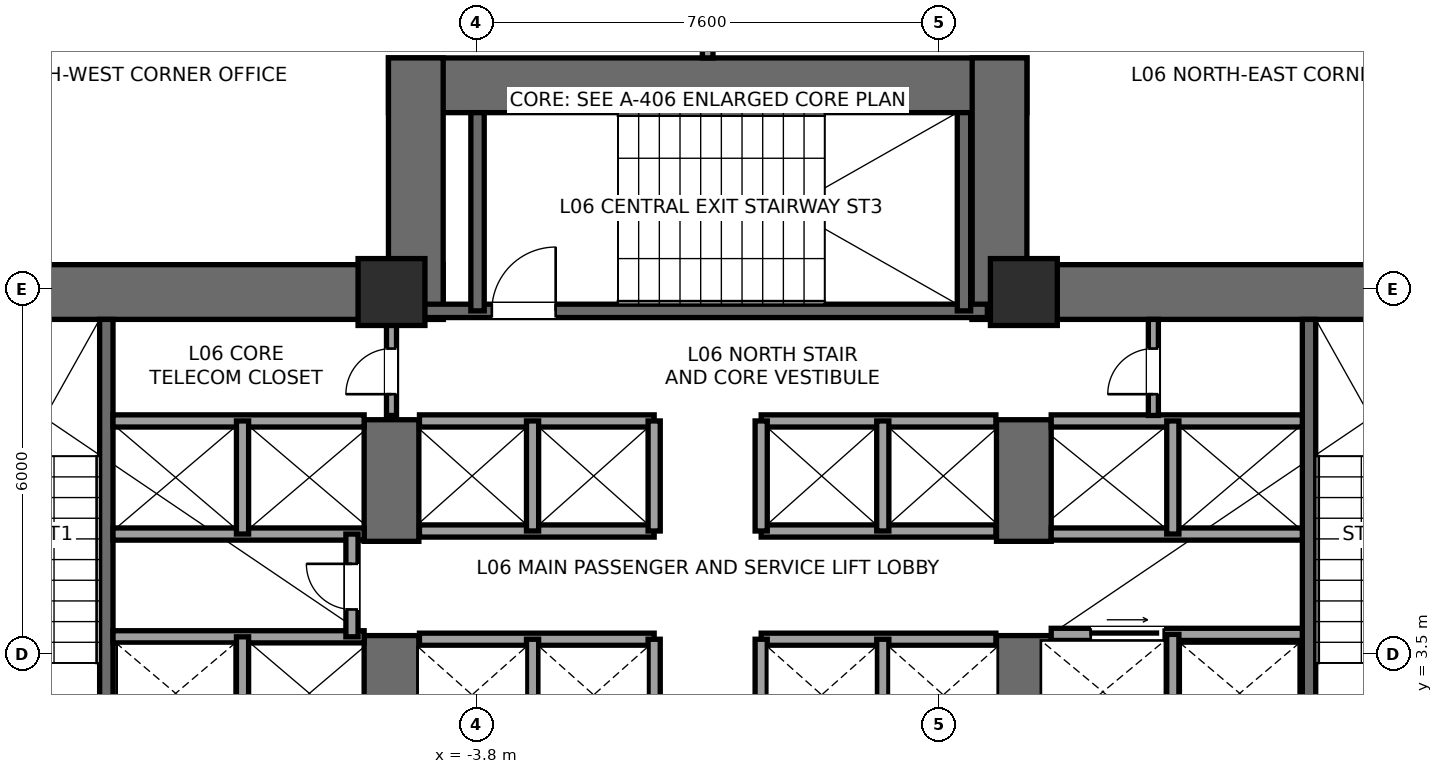
"""IFC4 building model, lengths in metres.
Left out: names, types, materials, properties, quantities, classifications, styles, units other than length and angle.
Written with IfcOpenShell. Run it as: python <this file> out.ifc"""

import sys

from ifc_helpers import new_model, si_unit, direction, frame, frame_2d, origin, origin_2d, place, context, subcontext, project, spatial, rectangle, extrude, element, fill, save


model = new_model("IFC4")
c1 = context("Model", 3, precision=1e-05, world=origin(), true_north=direction((0.0, 1.0)))
c2 = subcontext(c1, "Body", "Model", "MODEL_VIEW")
j1 = project(units=[si_unit("LENGTHUNIT", "METRE"), si_unit("PLANEANGLEUNIT", "RADIAN")], contexts=[c1])
p1 = place(None, origin())
s1 = spatial("IfcSite", under=j1, at=p1, CompositionType="ELEMENT")
p2 = place(p1, origin())
s2 = spatial("IfcBuilding", under=s1, at=p2, CompositionType="ELEMENT")
p3 = place(p2, frame((0.0, 0.0, 27.0)))
s3 = spatial("IfcBuildingStorey", under=s2, at=p3, CompositionType="ELEMENT", Elevation=27.0)
p4 = place(p3, frame((-14.05, 9.45, 0.0), z_axis=(0.0, 0.0, 1.0), x_axis=(1.0, 0.0, 0.0)))
e1 = element("IfcWall", 1, at=p4, inside=s3, PredefinedType="SHEAR", context=c2, shape_type="SweptSolid", body=[
    extrude(rectangle(XDim=9.7, YDim=0.9, at=frame_2d((4.85, 0.0))), origin(), (0.0, 0.0, 1.0), 3.6),
])
p5 = place(p3, frame((-5.2, 0.95, 0.0), z_axis=(0.0, 0.0, 1.0), x_axis=(0.0, 1.0, 0.0)))
e2 = element("IfcWall", 2, at=p5, inside=s3, PredefinedType="SHEAR", context=c2, shape_type="SweptSolid", body=[
    extrude(rectangle(XDim=2.85, YDim=0.9, at=frame_2d((1.425, 0.0))), origin(), (0.0, 0.0, 1.0), 3.6),
])
p6 = place(p3, frame((-5.2, 5.35, 0.0), z_axis=(0.0, 0.0, 1.0), x_axis=(0.0, 1.0, 0.0)))
e3 = element("IfcWall", 3, at=p6, inside=s3, PredefinedType="SHEAR", context=c2, shape_type="SweptSolid", body=[
    extrude(rectangle(XDim=2.0, YDim=0.9, at=frame_2d((1.0, 0.0))), origin(), (0.0, 0.0, 1.0), 3.6),
])
p7 = place(p3, frame((-9.89, 1.85, 0.0), z_axis=(0.0, 0.0, 1.0), x_axis=(0.0, 1.0, 0.0)))
e4 = element("IfcWall", 4, at=p7, inside=s3, PredefinedType="SHEAR", context=c2, shape_type="SweptSolid", body=[
    extrude(rectangle(XDim=7.15, YDim=0.22, at=frame_2d((3.575, 0.0))), origin(), (0.0, 0.0, 1.0), 3.6),
])
p8 = place(p3, frame((4.35, 9.45, 0.0), z_axis=(0.0, 0.0, 1.0), x_axis=(1.0, 0.0, 0.0)))
e5 = element("IfcWall", 5, at=p8, inside=s3, PredefinedType="SHEAR", context=c2, shape_type="SweptSolid", body=[
    extrude(rectangle(XDim=9.7, YDim=0.9, at=frame_2d((4.85, 0.0))), origin(), (0.0, 0.0, 1.0), 3.6),
])
p9 = place(p3, frame((5.2, 0.95, 0.0), z_axis=(0.0, 0.0, 1.0), x_axis=(0.0, 1.0, 0.0)))
e6 = element("IfcWall", 6, at=p9, inside=s3, PredefinedType="SHEAR", context=c2, shape_type="SweptSolid", body=[
    extrude(rectangle(XDim=2.85, YDim=0.9, at=frame_2d((1.425, 0.0))), origin(), (0.0, 0.0, 1.0), 3.6),
])
p10 = place(p3, frame((5.2, 5.35, 0.0), z_axis=(0.0, 0.0, 1.0), x_axis=(0.0, 1.0, 0.0)))
e7 = element("IfcWall", 7, at=p10, inside=s3, PredefinedType="SHEAR", context=c2, shape_type="SweptSolid", body=[
    extrude(rectangle(XDim=2.0, YDim=0.9, at=frame_2d((1.0, 0.0))), origin(), (0.0, 0.0, 1.0), 3.6),
])
p11 = place(p3, frame((9.89, 1.85, 0.0), z_axis=(0.0, 0.0, 1.0), x_axis=(0.0, 1.0, 0.0)))
e8 = element("IfcWall", 8, at=p11, inside=s3, PredefinedType="SHEAR", context=c2, shape_type="SweptSolid", body=[
    extrude(rectangle(XDim=7.15, YDim=0.22, at=frame_2d((3.575, 0.0))), origin(), (0.0, 0.0, 1.0), 3.6),
])
p12 = place(p3, frame((-5.25, 12.85, 0.0), z_axis=(0.0, 0.0, 1.0), x_axis=(1.0, 0.0, 0.0)))
e9 = element("IfcWall", 9, at=p12, inside=s3, PredefinedType="SHEAR", context=c2, shape_type="SweptSolid", body=[
    extrude(rectangle(XDim=10.5, YDim=0.9, at=frame_2d((5.25, 0.0))), origin(), (0.0, 0.0, 1.0), 3.6),
])
for number, where, z_axis, x_axis in (
    (10, (-4.8, 9.0, 0.0), (0.0, 0.0, 1.0), (0.0, 1.0, 0.0)),
    (11, (4.8, 9.0, 0.0), (0.0, 0.0, 1.0), (0.0, 1.0, 0.0)),
):
    element("IfcWall", number, at=place(p3, frame(where, z_axis=z_axis, x_axis=x_axis)), inside=s3, PredefinedType="SHEAR", context=c2, shape_type="SweptSolid", body=[
        extrude(rectangle(XDim=4.3, YDim=0.9, at=frame_2d((2.15, 0.0))), origin(), (0.0, 0.0, 1.0), 3.6),
    ])
p13 = place(p3, frame((-4.7, 9.14, 0.0), z_axis=(0.0, 0.0, 1.0), x_axis=(1.0, 0.0, 0.0)))
e12 = element("IfcWall", 12, at=p13, inside=s3, PredefinedType="SHEAR", context=c2, shape_type="SweptSolid", body=[
    extrude(rectangle(XDim=9.3, YDim=0.22, at=frame_2d((4.65, 0.0))), origin(), (0.0, 0.0, 1.0), 3.6),
])
p14 = place(p13, frame((1.15, 0.0, 0.0)))
e13 = element("IfcOpeningElement", 13, at=p14, cuts=e12, PredefinedType="OPENING", context=c2, shape_type="SweptSolid", body=[
    extrude(rectangle(XDim=1.05, YDim=2.15, at=frame_2d((0.525, 1.075))), frame((0.0, 0.12, 0.0), z_axis=(0.0, -1.0, 0.0), x_axis=(1.0, 0.0, 0.0)), (0.0, 0.0, 1.0), 0.24),
])
for number, where, z_axis, x_axis in (
    (14, (-3.785, 9.14, 0.0), (0.0, 0.0, 1.0), (0.0, 1.0, 0.0)),
    (15, (4.215, 9.14, 0.0), (0.0, 0.0, 1.0), (0.0, 1.0, 0.0)),
):
    element("IfcWall", number, at=place(p3, frame(where, z_axis=z_axis, x_axis=x_axis)), inside=s3, PredefinedType="SHEAR", context=c2, shape_type="SweptSolid", body=[
        extrude(rectangle(XDim=3.26, YDim=0.22, at=frame_2d((1.63, 0.0))), origin(), (0.0, 0.0, 1.0), 3.6),
    ])
for number, where, z_axis, x_axis in (
    (16, (-5.2, 9.45, 0.0), (0.0, 0.0, 1.0), (1.0, 0.0, 0.0)),
    (17, (5.2, 9.45, 0.0), (0.0, 0.0, 1.0), (1.0, 0.0, 0.0)),
):
    element("IfcColumn", number, at=place(p3, frame(where, z_axis=z_axis, x_axis=x_axis)), inside=s3, PredefinedType="COLUMN", context=c2, shape_type="SweptSolid", body=[
        extrude(rectangle(XDim=1.1, YDim=1.1, at=origin_2d()), origin(), (0.0, 0.0, 1.0), 3.6),
    ])
p15 = place(p3, frame((-9.78, 3.78, 0.0), z_axis=(0.0, 0.0, 1.0), x_axis=(1.0, 0.0, 0.0)))
e18 = element("IfcWall", 18, at=p15, inside=s3, PredefinedType="SOLIDWALL", context=c2, shape_type="SweptSolid", body=[
    extrude(rectangle(XDim=4.13, YDim=0.2, at=frame_2d((2.065, 0.0))), origin(), (0.0, 0.0, 1.0), 3.4),
])
p16 = place(p3, frame((-7.65, 1.85, 0.0), z_axis=(0.0, 0.0, 1.0), x_axis=(0.0, 1.0, 0.0)))
e19 = element("IfcWall", 19, at=p16, inside=s3, PredefinedType="SOLIDWALL", context=c2, shape_type="SweptSolid", body=[
    extrude(rectangle(XDim=1.93, YDim=0.2, at=frame_2d((0.965, 0.0))), origin(), (0.0, 0.0, 1.0), 3.4),
])
for number, where, z_axis, x_axis in (
    (20, (-9.78, 5.47, 0.0), (0.0, 0.0, 1.0), (1.0, 0.0, 0.0)),
    (21, (-9.78, 7.33, 0.0), (0.0, 0.0, 1.0), (1.0, 0.0, 0.0)),
):
    element("IfcWall", number, at=place(p3, frame(where, z_axis=z_axis, x_axis=x_axis)), inside=s3, PredefinedType="SOLIDWALL", context=c2, shape_type="SweptSolid", body=[
        extrude(rectangle(XDim=4.13, YDim=0.2, at=frame_2d((2.065, 0.0))), origin(), (0.0, 0.0, 1.0), 3.4),
    ])
p17 = place(p3, frame((-7.65, 5.47, 0.0), z_axis=(0.0, 0.0, 1.0), x_axis=(0.0, 1.0, 0.0)))
e22 = element("IfcWall", 22, at=p17, inside=s3, PredefinedType="SOLIDWALL", context=c2, shape_type="SweptSolid", body=[
    extrude(rectangle(XDim=1.86, YDim=0.2, at=frame_2d((0.93, 0.0))), origin(), (0.0, 0.0, 1.0), 3.4),
])
p18 = place(p3, frame((-5.85, 3.78, 0.0), z_axis=(0.0, 0.0, 1.0), x_axis=(0.0, 1.0, 0.0)))
e23 = element("IfcWall", 23, at=p18, inside=s3, PredefinedType="SOLIDWALL", context=c2, shape_type="SweptSolid", body=[
    extrude(rectangle(XDim=1.69, YDim=0.2, at=frame_2d((0.845, 0.0))), origin(), (0.0, 0.0, 1.0), 3.4),
])
p19 = place(p18, frame((0.45, 0.0, 0.0)))
e24 = element("IfcOpeningElement", 24, at=p19, cuts=e23, PredefinedType="OPENING", context=c2, shape_type="SweptSolid", body=[
    extrude(rectangle(XDim=0.75, YDim=2.1, at=frame_2d((0.375, 1.05))), frame((0.0, 0.11, 0.0), z_axis=(0.0, -1.0, 0.0), x_axis=(1.0, 0.0, 0.0)), (0.0, 0.0, 1.0), 0.22),
])
p20 = place(p3, frame((5.65, 3.82, 0.0), z_axis=(0.0, 0.0, 1.0), x_axis=(1.0, 0.0, 0.0)))
e25 = element("IfcWall", 25, at=p20, inside=s3, PredefinedType="SOLIDWALL", context=c2, shape_type="SweptSolid", body=[
    extrude(rectangle(XDim=4.13, YDim=0.2, at=frame_2d((2.065, 0.0))), origin(), (0.0, 0.0, 1.0), 3.4),
])
p21 = place(p20, frame((0.65, 0.0, 0.0)))
e26 = element("IfcOpeningElement", 26, at=p21, cuts=e25, PredefinedType="OPENING", context=c2, shape_type="SweptSolid", body=[
    extrude(rectangle(XDim=1.2, YDim=2.2, at=frame_2d((0.6, 1.1))), frame((0.0, 0.11, 0.0), z_axis=(0.0, -1.0, 0.0), x_axis=(1.0, 0.0, 0.0)), (0.0, 0.0, 1.0), 0.22),
])
p22 = place(p3, frame((7.65, 1.85, 0.0), z_axis=(0.0, 0.0, 1.0), x_axis=(0.0, 1.0, 0.0)))
e27 = element("IfcWall", 27, at=p22, inside=s3, PredefinedType="SOLIDWALL", context=c2, shape_type="SweptSolid", body=[
    extrude(rectangle(XDim=1.97, YDim=0.2, at=frame_2d((0.985, 0.0))), origin(), (0.0, 0.0, 1.0), 3.4),
])
for number, where, z_axis, x_axis in (
    (28, (5.65, 5.47, 0.0), (0.0, 0.0, 1.0), (1.0, 0.0, 0.0)),
    (29, (5.65, 7.33, 0.0), (0.0, 0.0, 1.0), (1.0, 0.0, 0.0)),
):
    element("IfcWall", number, at=place(p3, frame(where, z_axis=z_axis, x_axis=x_axis)), inside=s3, PredefinedType="SOLIDWALL", context=c2, shape_type="SweptSolid", body=[
        extrude(rectangle(XDim=4.13, YDim=0.2, at=frame_2d((2.065, 0.0))), origin(), (0.0, 0.0, 1.0), 3.4),
    ])
p23 = place(p3, frame((7.65, 5.47, 0.0), z_axis=(0.0, 0.0, 1.0), x_axis=(0.0, 1.0, 0.0)))
e30 = element("IfcWall", 30, at=p23, inside=s3, PredefinedType="SOLIDWALL", context=c2, shape_type="SweptSolid", body=[
    extrude(rectangle(XDim=1.86, YDim=0.2, at=frame_2d((0.93, 0.0))), origin(), (0.0, 0.0, 1.0), 3.4),
])
for number, where, z_axis, x_axis in (
    (31, (-4.74, 3.74, 0.0), (0.0, 0.0, 1.0), (1.0, 0.0, 0.0)),
    (32, (0.88, 3.74, 0.0), (0.0, 0.0, 1.0), (1.0, 0.0, 0.0)),
):
    element("IfcWall", number, at=place(p3, frame(where, z_axis=z_axis, x_axis=x_axis)), inside=s3, PredefinedType="SOLIDWALL", context=c2, shape_type="SweptSolid", body=[
        extrude(rectangle(XDim=3.86, YDim=0.2, at=frame_2d((1.93, 0.0))), origin(), (0.0, 0.0, 1.0), 3.4),
    ])
for number, where, z_axis, x_axis in (
    (33, (-2.88, 1.92, 0.0), (0.0, 0.0, 1.0), (0.0, 1.0, 0.0)),
    (34, (2.88, 1.92, 0.0), (0.0, 0.0, 1.0), (0.0, 1.0, 0.0)),
    (35, (-0.88, 1.92, 0.0), (0.0, 0.0, 1.0), (0.0, 1.0, 0.0)),
    (36, (0.88, 1.92, 0.0), (0.0, 0.0, 1.0), (0.0, 1.0, 0.0)),
):
    element("IfcWall", number, at=place(p3, frame(where, z_axis=z_axis, x_axis=x_axis)), inside=s3, PredefinedType="SOLIDWALL", context=c2, shape_type="SweptSolid", body=[
        extrude(rectangle(XDim=1.82, YDim=0.2, at=frame_2d((0.91, 0.0))), origin(), (0.0, 0.0, 1.0), 3.4),
    ])
for number, where, z_axis, x_axis in (
    (37, (-4.74, 5.52, 0.0), (0.0, 0.0, 1.0), (1.0, 0.0, 0.0)),
    (38, (0.88, 5.52, 0.0), (0.0, 0.0, 1.0), (1.0, 0.0, 0.0)),
    (39, (-4.74, 7.33, 0.0), (0.0, 0.0, 1.0), (1.0, 0.0, 0.0)),
    (40, (0.88, 7.33, 0.0), (0.0, 0.0, 1.0), (1.0, 0.0, 0.0)),
):
    element("IfcWall", number, at=place(p3, frame(where, z_axis=z_axis, x_axis=x_axis)), inside=s3, PredefinedType="SOLIDWALL", context=c2, shape_type="SweptSolid", body=[
        extrude(rectangle(XDim=3.86, YDim=0.2, at=frame_2d((1.93, 0.0))), origin(), (0.0, 0.0, 1.0), 3.4),
    ])
for number, where, z_axis, x_axis in (
    (41, (-2.88, 5.52, 0.0), (0.0, 0.0, 1.0), (0.0, 1.0, 0.0)),
    (42, (2.88, 5.52, 0.0), (0.0, 0.0, 1.0), (0.0, 1.0, 0.0)),
    (43, (-0.88, 5.52, 0.0), (0.0, 0.0, 1.0), (0.0, 1.0, 0.0)),
    (44, (0.88, 5.52, 0.0), (0.0, 0.0, 1.0), (0.0, 1.0, 0.0)),
):
    element("IfcWall", number, at=place(p3, frame(where, z_axis=z_axis, x_axis=x_axis)), inside=s3, PredefinedType="SOLIDWALL", context=c2, shape_type="SweptSolid", body=[
        extrude(rectangle(XDim=1.81, YDim=0.2, at=frame_2d((0.905, 0.0))), origin(), (0.0, 0.0, 1.0), 3.4),
    ])
p24 = place(p3, frame((-5.2, 7.42, 0.0), z_axis=(0.0, 0.0, 1.0), x_axis=(0.0, 1.0, 0.0)))
e45 = element("IfcWall", 45, at=p24, inside=s3, PredefinedType="PARTITIONING", context=c2, shape_type="SweptSolid", body=[
    extrude(rectangle(XDim=1.58, YDim=0.165, at=frame_2d((0.79, 0.0))), origin(), (0.0, 0.0, 1.0), 3.4),
])
p25 = place(p24, frame((0.35, 0.0, 0.0)))
e46 = element("IfcOpeningElement", 46, at=p25, cuts=e45, PredefinedType="OPENING", context=c2, shape_type="SweptSolid", body=[
    extrude(rectangle(XDim=0.75, YDim=2.1, at=frame_2d((0.375, 1.05))), frame((0.0, 0.093, 0.0), z_axis=(0.0, -1.0, 0.0), x_axis=(1.0, 0.0, 0.0)), (0.0, 0.0, 1.0), 0.185),
])
p26 = place(p3, frame((7.33, 7.42, 0.0), z_axis=(0.0, 0.0, 1.0), x_axis=(0.0, 1.0, 0.0)))
e47 = element("IfcWall", 47, at=p26, inside=s3, PredefinedType="PARTITIONING", context=c2, shape_type="SweptSolid", body=[
    extrude(rectangle(XDim=1.58, YDim=0.165, at=frame_2d((0.79, 0.0))), origin(), (0.0, 0.0, 1.0), 3.4),
])
p27 = place(p26, frame((0.35, 0.0, 0.0)))
e48 = element("IfcOpeningElement", 48, at=p27, cuts=e47, PredefinedType="OPENING", context=c2, shape_type="SweptSolid", body=[
    extrude(rectangle(XDim=0.75, YDim=2.1, at=frame_2d((0.375, 1.05))), frame((0.0, 0.093, 0.0), z_axis=(0.0, -1.0, 0.0), x_axis=(1.0, 0.0, 0.0)), (0.0, 0.0, 1.0), 0.185),
])
p28 = place(p3, frame((0.0, 13.3, 0.0), z_axis=(0.0, 0.0, 1.0), x_axis=(0.0, 1.0, 0.0)))
e49 = element("IfcWall", 49, at=p28, inside=s3, PredefinedType="PARTITIONING", context=c2, shape_type="SweptSolid", body=[
    extrude(rectangle(XDim=3.128, YDim=0.175, at=frame_2d((1.564, 0.0))), origin(), (0.0, 0.0, 1.0), 3.4),
])
p29 = place(p14, origin())
e50 = element("IfcDoor", 50, at=p29, inside=s3, OperationType="SINGLE_SWING_RIGHT", PredefinedType="DOOR", context=c2, shape_type="SweptSolid", body=[
    extrude(rectangle(XDim=1.05, YDim=2.15, at=frame_2d((0.525, 1.075))), frame((0.0, 0.025, 0.0), z_axis=(0.0, -1.0, 0.0), x_axis=(1.0, 0.0, 0.0)), (0.0, 0.0, 1.0), 0.05),
])
fill(e13, e50)
p30 = place(p19, origin())
e51 = element("IfcDoor", 51, at=p30, inside=s3, OperationType="SINGLE_SWING_RIGHT", PredefinedType="DOOR", context=c2, shape_type="SweptSolid", body=[
    extrude(rectangle(XDim=0.75, YDim=2.1, at=frame_2d((0.375, 1.05))), frame((0.0, 0.025, 0.0), z_axis=(0.0, -1.0, 0.0), x_axis=(1.0, 0.0, 0.0)), (0.0, 0.0, 1.0), 0.05),
])
fill(e24, e51)
p31 = place(p21, origin())
e52 = element("IfcDoor", 52, at=p31, inside=s3, OperationType="SLIDING_TO_RIGHT", PredefinedType="DOOR", context=c2, shape_type="SweptSolid", body=[
    extrude(rectangle(XDim=1.2, YDim=2.2, at=frame_2d((0.6, 1.1))), frame((0.0, 0.025, 0.0), z_axis=(0.0, -1.0, 0.0), x_axis=(1.0, 0.0, 0.0)), (0.0, 0.0, 1.0), 0.05),
])
fill(e26, e52)
p32 = place(p25, origin())
e53 = element("IfcDoor", 53, at=p32, inside=s3, OperationType="SINGLE_SWING_LEFT", PredefinedType="DOOR", context=c2, shape_type="SweptSolid", body=[
    extrude(rectangle(XDim=0.75, YDim=2.1, at=frame_2d((0.375, 1.05))), frame((0.0, 0.025, 0.0), z_axis=(0.0, -1.0, 0.0), x_axis=(1.0, 0.0, 0.0)), (0.0, 0.0, 1.0), 0.05),
])
fill(e46, e53)
p33 = place(p27, origin())
e54 = element("IfcDoor", 54, at=p33, inside=s3, OperationType="SINGLE_SWING_LEFT", PredefinedType="DOOR", context=c2, shape_type="SweptSolid", body=[
    extrude(rectangle(XDim=0.75, YDim=2.1, at=frame_2d((0.375, 1.05))), frame((0.0, 0.025, 0.0), z_axis=(0.0, -1.0, 0.0), x_axis=(1.0, 0.0, 0.0)), (0.0, 0.0, 1.0), 0.05),
])
fill(e48, e54)
save(model, sys.argv[1])
